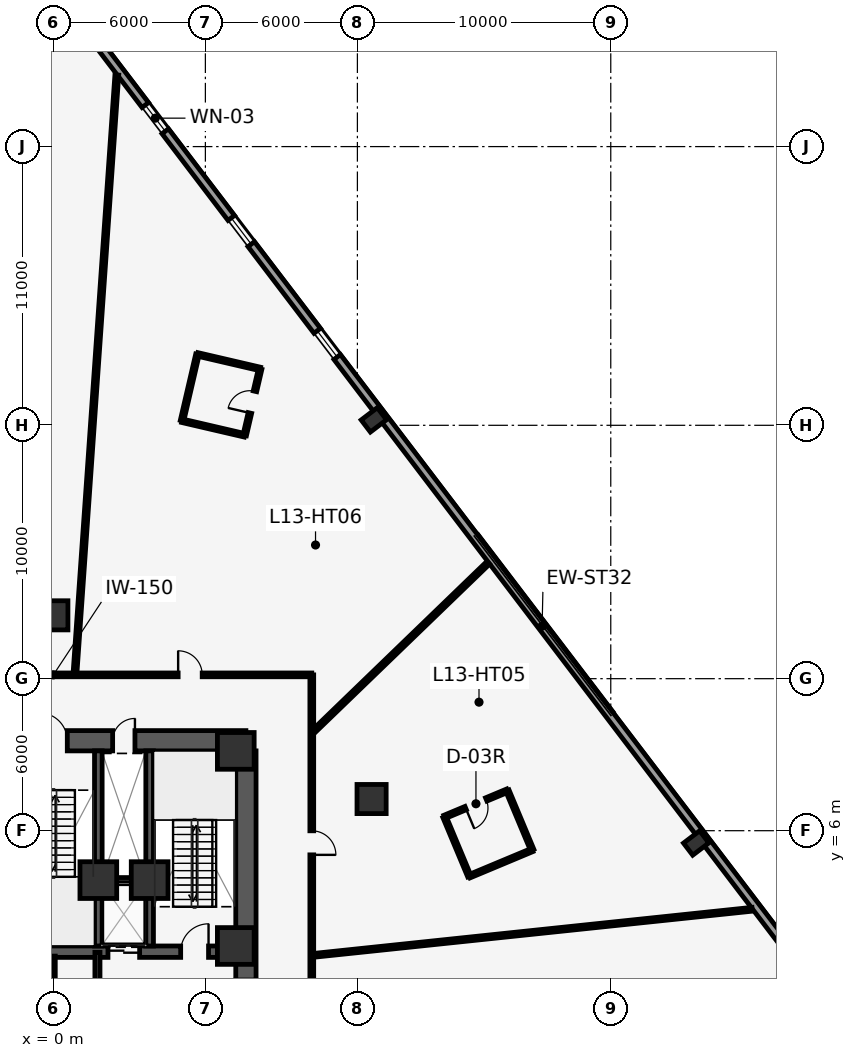
"""IFC4 building model, lengths in metres.
Left out: names, types, materials, properties, quantities, classifications, styles, units other than length and angle.
Written with IfcOpenShell. Run it as: python <this file> out.ifc"""

import sys

from ifc_helpers import new_model, si_unit, direction, frame, frame_2d, origin, origin_2d, place, context, subcontext, project, spatial, rectangle, hollow_rectangle, extrude, element, fill, save


model = new_model("IFC4")
c1 = context("Model", 3, precision=1e-05, world=origin(), true_north=direction((0.0, 1.0)))
c2 = subcontext(c1, "Body", "Model", "MODEL_VIEW")
j1 = project(units=[si_unit("LENGTHUNIT", "METRE"), si_unit("PLANEANGLEUNIT", "RADIAN")], contexts=[c1])
p1 = place(None, origin())
s1 = spatial("IfcSite", under=j1, at=p1, CompositionType="ELEMENT")
p2 = place(p1, origin())
s2 = spatial("IfcBuilding", under=s1, at=p2, CompositionType="ELEMENT")
p3 = place(p2, frame((0.0, 0.0, 62.4)))
s3 = spatial("IfcBuildingStorey", under=s2, at=p3, CompositionType="ELEMENT", Elevation=62.4)
p4 = place(p3, frame((-7.6, 9.55, 0.0), z_axis=(0.0, 0.0, 1.0), x_axis=(1.0, 0.0, 0.0)))
e1 = element("IfcWall", 1, at=p4, inside=s3, PredefinedType="SHEAR", context=c2, shape_type="SweptSolid", body=[
    extrude(rectangle(XDim=15.2, YDim=0.8, at=frame_2d((7.6, 0.0))), origin(), (0.0, 0.0, 1.0), 4.35),
])
p5 = place(p4, frame((7.05, 0.0, 0.0)))
e2 = element("IfcOpeningElement", 2, at=p5, cuts=e1, PredefinedType="OPENING", context=c2, shape_type="SweptSolid", body=[
    extrude(rectangle(XDim=1.1, YDim=2.15, at=frame_2d((0.55, 1.075))), frame((0.0, 0.41, 0.0), z_axis=(0.0, -1.0, 0.0), x_axis=(1.0, 0.0, 0.0)), (0.0, 0.0, 1.0), 0.82),
])
p6 = place(p4, frame((4.38, 0.0, 0.0)))
e3 = element("IfcOpeningElement", 3, at=p6, cuts=e1, PredefinedType="OPENING", context=c2, shape_type="SweptSolid", body=[
    extrude(rectangle(XDim=0.88, YDim=2.15, at=frame_2d((0.44, 1.075))), frame((0.0, 0.41, 0.0), z_axis=(0.0, -1.0, 0.0), x_axis=(1.0, 0.0, 0.0)), (0.0, 0.0, 1.0), 0.82),
])
p7 = place(p4, frame((9.94, 0.0, 0.0)))
e4 = element("IfcOpeningElement", 4, at=p7, cuts=e1, PredefinedType="OPENING", context=c2, shape_type="SweptSolid", body=[
    extrude(rectangle(XDim=0.88, YDim=2.15, at=frame_2d((0.44, 1.075))), frame((0.0, 0.41, 0.0), z_axis=(0.0, -1.0, 0.0), x_axis=(1.0, 0.0, 0.0)), (0.0, 0.0, 1.0), 0.82),
])
p8 = place(p3, frame((-7.2, 1.225, 0.0), z_axis=(0.0, 0.0, 1.0), x_axis=(1.0, 0.0, 0.0)))
e5 = element("IfcWall", 5, at=p8, inside=s3, PredefinedType="SHEAR", context=c2, shape_type="SweptSolid", body=[
    extrude(rectangle(XDim=14.4, YDim=0.45, at=frame_2d((7.2, 0.0))), origin(), (0.0, 0.0, 1.0), 4.35),
])
p9 = place(p8, frame((3.795, 0.0, 0.0)))
e6 = element("IfcOpeningElement", 6, at=p9, cuts=e5, PredefinedType="OPENING", context=c2, shape_type="SweptSolid", body=[
    extrude(rectangle(XDim=1.25, YDim=2.25, at=frame_2d((0.625, 1.125))), frame((0.0, 0.235, 0.0), z_axis=(0.0, -1.0, 0.0), x_axis=(1.0, 0.0, 0.0)), (0.0, 0.0, 1.0), 0.47),
])
p10 = place(p8, frame((9.355, 0.0, 0.0)))
e7 = element("IfcOpeningElement", 7, at=p10, cuts=e5, PredefinedType="OPENING", context=c2, shape_type="SweptSolid", body=[
    extrude(rectangle(XDim=1.25, YDim=2.25, at=frame_2d((0.625, 1.125))), frame((0.0, 0.235, 0.0), z_axis=(0.0, -1.0, 0.0), x_axis=(1.0, 0.0, 0.0)), (0.0, 0.0, 1.0), 0.47),
])
p11 = place(p8, frame((1.075, 0.0, 0.0)))
e8 = element("IfcOpeningElement", 8, at=p11, cuts=e5, PredefinedType="OPENING", context=c2, shape_type="SweptSolid", body=[
    extrude(rectangle(XDim=1.1, YDim=2.15, at=frame_2d((0.55, 1.075))), frame((0.0, 0.235, 0.0), z_axis=(0.0, -1.0, 0.0), x_axis=(1.0, 0.0, 0.0)), (0.0, 0.0, 1.0), 0.47),
])
p12 = place(p8, frame((12.225, 0.0, 0.0)))
e9 = element("IfcOpeningElement", 9, at=p12, cuts=e5, PredefinedType="OPENING", context=c2, shape_type="SweptSolid", body=[
    extrude(rectangle(XDim=1.1, YDim=2.15, at=frame_2d((0.55, 1.075))), frame((0.0, 0.235, 0.0), z_axis=(0.0, -1.0, 0.0), x_axis=(1.0, 0.0, 0.0)), (0.0, 0.0, 1.0), 0.47),
])
for number, where, z_axis, x_axis in (
    (10, (1.775, 1.45, 0.0), (0.0, 0.0, 1.0), (0.0, 1.0, 0.0)),
    (11, (3.8, 1.45, 0.0), (0.0, 0.0, 1.0), (0.0, 1.0, 0.0)),
):
    element("IfcWall", number, at=place(p3, frame(where, z_axis=z_axis, x_axis=x_axis)), inside=s3, PredefinedType="SHEAR", context=c2, shape_type="SweptSolid", body=[
        extrude(rectangle(XDim=7.7, YDim=0.3, at=frame_2d((3.85, 0.0))), origin(), (0.0, 0.0, 1.0), 4.35),
    ])
p13 = place(p3, frame((7.6, 0.1, 0.0), z_axis=(0.0, 0.0, 1.0), x_axis=(0.0, 1.0, 0.0)))
e12 = element("IfcWall", 12, at=p13, inside=s3, PredefinedType="SHEAR", context=c2, shape_type="SweptSolid", body=[
    extrude(rectangle(XDim=9.05, YDim=0.8, at=frame_2d((4.525, 0.0))), origin(), (0.0, 0.0, 1.0), 4.35),
])
for number, where, z_axis, x_axis in (
    (13, (7.2, 1.45, 0.0), (0.0, 0.0, 1.0), (1.0, 0.0, 0.0)),
    (14, (7.2, 9.15, 0.0), (0.0, 0.0, 1.0), (1.0, 0.0, 0.0)),
    (15, (3.8, 4.05, 0.0), (0.0, 0.0, 1.0), (1.0, 0.0, 0.0)),
    (16, (1.775, 4.05, 0.0), (0.0, 0.0, 1.0), (1.0, 0.0, 0.0)),
):
    element("IfcColumn", number, at=place(p3, frame(where, z_axis=z_axis, x_axis=x_axis)), inside=s3, PredefinedType="COLUMN", context=c2, shape_type="SweptSolid", body=[
        extrude(rectangle(XDim=1.45, YDim=1.45, at=origin_2d()), origin(), (0.0, 0.0, 1.0), 4.6),
    ])
for number, where, z_axis, x_axis in (
    (17, (12.56, 7.25, 0.0), (0.0, 0.0, 1.0), (1.0, 0.0, 0.0)),
    (18, (0.0, 14.5, 0.0), (0.0, 0.0, 1.0), (1.0, 0.0, 0.0)),
):
    element("IfcColumn", number, at=place(p3, frame(where, z_axis=z_axis, x_axis=x_axis)), inside=s3, PredefinedType="COLUMN", context=c2, shape_type="SweptSolid", body=[
        extrude(rectangle(XDim=1.15, YDim=1.15, at=origin_2d()), origin(), (0.0, 0.0, 1.0), 4.6),
    ])
for number, where, z_axis, x_axis in (
    (19, (25.371, 5.514, 0.0), (0.0, 0.0, 1.0), (-0.606, 0.795, 0.0)),
    (20, (12.649, 22.215, 0.0), (0.0, 0.0, 1.0), (-0.606, 0.795, 0.0)),
):
    element("IfcColumn", number, at=place(p3, frame(where, z_axis=z_axis, x_axis=x_axis)), inside=s3, PredefinedType="COLUMN", context=c2, shape_type="SweptSolid", body=[
        extrude(hollow_rectangle(XDim=0.6, YDim=0.8, WallThickness=0.05, at=origin_2d()), origin(), (0.0, 0.0, 1.0), 4.6),
    ])
p14 = place(p3, frame((-0.115, 39.555, 0.0), z_axis=(0.0, 0.0, 1.0), x_axis=(0.605877389385, -0.795558036243, 0.0)))
e21 = element("IfcWall", 21, at=p14, inside=s3, PredefinedType="STANDARD", context=c2, shape_type="SweptSolid", body=[
    extrude(rectangle(XDim=64.058, YDim=0.32, at=frame_2d((32.029, 0.0))), origin(), (0.0, 0.0, 1.0), 4.35),
])
p15 = place(p14, frame((6.179, 0.0, 0.85)))
e22 = element("IfcOpeningElement", 22, at=p15, cuts=e21, PredefinedType="OPENING", context=c2, shape_type="SweptSolid", body=[
    extrude(rectangle(XDim=1.3, YDim=2.1, at=frame_2d((0.65, 1.05))), frame((0.0, 0.17, 0.0), z_axis=(0.0, -1.0, 0.0), x_axis=(1.0, 0.0, 0.0)), (0.0, 0.0, 1.0), 0.34),
])
p16 = place(p14, frame((11.779, 0.0, 0.85)))
e23 = element("IfcOpeningElement", 23, at=p16, cuts=e21, PredefinedType="OPENING", context=c2, shape_type="SweptSolid", body=[
    extrude(rectangle(XDim=1.3, YDim=2.1, at=frame_2d((0.65, 1.05))), frame((0.0, 0.17, 0.0), z_axis=(0.0, -1.0, 0.0), x_axis=(1.0, 0.0, 0.0)), (0.0, 0.0, 1.0), 0.34),
])
p17 = place(p14, frame((17.379, 0.0, 0.85)))
e24 = element("IfcOpeningElement", 24, at=p17, cuts=e21, PredefinedType="OPENING", context=c2, shape_type="SweptSolid", body=[
    extrude(rectangle(XDim=1.3, YDim=2.1, at=frame_2d((0.65, 1.05))), frame((0.0, 0.17, 0.0), z_axis=(0.0, -1.0, 0.0), x_axis=(1.0, 0.0, 0.0)), (0.0, 0.0, 1.0), 0.34),
])
p18 = place(p14, frame((50.979, 0.0, 0.85)))
e25 = element("IfcOpeningElement", 25, at=p18, cuts=e21, PredefinedType="OPENING", context=c2, shape_type="SweptSolid", body=[
    extrude(rectangle(XDim=1.3, YDim=2.1, at=frame_2d((0.65, 1.05))), frame((0.0, 0.17, 0.0), z_axis=(0.0, -1.0, 0.0), x_axis=(1.0, 0.0, 0.0)), (0.0, 0.0, 1.0), 0.34),
])
p19 = place(p14, frame((56.579, 0.0, 0.85)))
e26 = element("IfcOpeningElement", 26, at=p19, cuts=e21, PredefinedType="OPENING", context=c2, shape_type="SweptSolid", body=[
    extrude(rectangle(XDim=1.3, YDim=2.1, at=frame_2d((0.65, 1.05))), frame((0.0, 0.17, 0.0), z_axis=(0.0, -1.0, 0.0), x_axis=(1.0, 0.0, 0.0)), (0.0, 0.0, 1.0), 0.34),
])
p20 = place(p3, frame((1.92, 4.05, 0.0), z_axis=(0.0, 0.0, 1.0), x_axis=(1.0, 0.0, 0.0)))
e27 = element("IfcWall", 27, at=p20, inside=s3, PredefinedType="PARTITIONING", context=c2, shape_type="SweptSolid", body=[
    extrude(rectangle(XDim=1.73, YDim=0.2, at=frame_2d((0.865, 0.0))), origin(), (0.0, 0.0, 1.0), 4.35),
])
p21 = place(p3, frame((1.74, -1.78, 0.0), z_axis=(0.0, 0.0, 1.0), x_axis=(0.0, 1.0, 0.0)))
e28 = element("IfcWall", 28, at=p21, inside=s3, PredefinedType="PARTITIONING", context=c2, shape_type="SweptSolid", body=[
    extrude(rectangle(XDim=2.98, YDim=0.2, at=frame_2d((1.49, 0.0))), origin(), (0.0, 0.0, 1.0), 4.35),
])
p22 = place(p21, frame((0.89, 0.0, 0.0)))
e29 = element("IfcOpeningElement", 29, at=p22, cuts=e28, PredefinedType="OPENING", context=c2, shape_type="SweptSolid", body=[
    extrude(rectangle(XDim=0.88, YDim=2.15, at=frame_2d((0.44, 1.075))), frame((0.0, 0.11, 0.0), z_axis=(0.0, -1.0, 0.0), x_axis=(1.0, 0.0, 0.0)), (0.0, 0.0, 1.0), 0.22),
])
p23 = place(p3, frame((0.0, -1.78, 0.0), z_axis=(0.0, 0.0, 1.0), x_axis=(0.0, 1.0, 0.0)))
e30 = element("IfcWall", 30, at=p23, inside=s3, PredefinedType="PARTITIONING", context=c2, shape_type="SweptSolid", body=[
    extrude(rectangle(XDim=2.83, YDim=0.15, at=frame_2d((1.415, 0.0))), origin(), (0.0, 0.0, 1.0), 4.35),
])
p24 = place(p3, frame((-10.2, 12.15, 0.0), z_axis=(0.0, 0.0, 1.0), x_axis=(1.0, 0.0, 0.0)))
e31 = element("IfcWall", 31, at=p24, inside=s3, PredefinedType="PARTITIONING", context=c2, shape_type="SweptSolid", body=[
    extrude(rectangle(XDim=20.4, YDim=0.15, at=frame_2d((10.2, 0.0))), origin(), (0.0, 0.0, 1.0), 4.35),
])
p25 = place(p24, frame((15.125, 0.0, 0.0)))
e32 = element("IfcOpeningElement", 32, at=p25, cuts=e31, PredefinedType="OPENING", context=c2, shape_type="SweptSolid", body=[
    extrude(rectangle(XDim=0.95, YDim=2.15, at=frame_2d((0.475, 1.075))), frame((0.0, 0.085, 0.0), z_axis=(0.0, -1.0, 0.0), x_axis=(1.0, 0.0, 0.0)), (0.0, 0.0, 1.0), 0.17),
])
p26 = place(p24, frame((6.62, 0.0, 0.0)))
e33 = element("IfcOpeningElement", 33, at=p26, cuts=e31, PredefinedType="OPENING", context=c2, shape_type="SweptSolid", body=[
    extrude(rectangle(XDim=0.95, YDim=2.15, at=frame_2d((0.475, 1.075))), frame((0.0, 0.085, 0.0), z_axis=(0.0, -1.0, 0.0), x_axis=(1.0, 0.0, 0.0)), (0.0, 0.0, 1.0), 0.17),
])
p27 = place(p3, frame((10.2, 12.15, 0.0), z_axis=(0.0, 0.0, 1.0), x_axis=(0.0, -1.0, 0.0)))
e34 = element("IfcWall", 34, at=p27, inside=s3, PredefinedType="PARTITIONING", context=c2, shape_type="SweptSolid", body=[
    extrude(rectangle(XDim=24.0, YDim=0.15, at=frame_2d((12.0, 0.0))), origin(), (0.0, 0.0, 1.0), 4.35),
])
p28 = place(p27, frame((14.875, 0.0, 0.0)))
e35 = element("IfcOpeningElement", 35, at=p28, cuts=e34, PredefinedType="OPENING", context=c2, shape_type="SweptSolid", body=[
    extrude(rectangle(XDim=0.95, YDim=2.15, at=frame_2d((0.475, 1.075))), frame((0.0, 0.085, 0.0), z_axis=(0.0, -1.0, 0.0), x_axis=(1.0, 0.0, 0.0)), (0.0, 0.0, 1.0), 0.17),
])
p29 = place(p27, frame((6.154, 0.0, 0.0)))
e36 = element("IfcOpeningElement", 36, at=p29, cuts=e34, PredefinedType="OPENING", context=c2, shape_type="SweptSolid", body=[
    extrude(rectangle(XDim=0.95, YDim=2.15, at=frame_2d((0.475, 1.075))), frame((0.0, 0.085, 0.0), z_axis=(0.0, -1.0, 0.0), x_axis=(1.0, 0.0, 0.0)), (0.0, 0.0, 1.0), 0.17),
])
p30 = place(p3, frame((10.305, 1.083, 0.0), z_axis=(0.0, 0.0, 1.0), x_axis=(0.994521458831, 0.104532616559, 0.0)))
e37 = element("IfcWall", 37, at=p30, inside=s3, PredefinedType="PARTITIONING", context=c2, shape_type="SweptSolid", body=[
    extrude(rectangle(XDim=17.372, YDim=0.15, at=frame_2d((8.686, 0.0))), origin(), (0.0, 0.0, 1.0), 4.35),
])
p31 = place(p3, frame((10.305, 9.951, 0.0), z_axis=(0.0, 0.0, 1.0), x_axis=(0.719350731968, 0.694647050247, 0.0)))
e38 = element("IfcWall", 38, at=p31, inside=s3, PredefinedType="PARTITIONING", context=c2, shape_type="SweptSolid", body=[
    extrude(rectangle(XDim=9.537, YDim=0.15, at=frame_2d((4.769, 0.0))), origin(), (0.0, 0.0, 1.0), 4.35),
])
p32 = place(p3, frame((0.857, 12.255, 0.0), z_axis=(0.0, 0.0, 1.0), x_axis=(0.069754890423, 0.997564160975, 0.0)))
e39 = element("IfcWall", 39, at=p32, inside=s3, PredefinedType="PARTITIONING", context=c2, shape_type="SweptSolid", body=[
    extrude(rectangle(XDim=23.628, YDim=0.15, at=frame_2d((11.814, 0.0))), origin(), (0.0, 0.0, 1.0), 4.35),
])
p33 = place(p3, frame((16.419, 4.201, 0.0), z_axis=(0.0, 0.0, 1.0), x_axis=(0.922509383508, 0.385974658934, 0.0)))
e40 = element("IfcWall", 40, at=p33, inside=s3, PredefinedType="PARTITIONING", context=c2, shape_type="SweptSolid", body=[
    extrude(rectangle(XDim=2.69, YDim=0.14, at=frame_2d((1.345, 0.0))), origin(), (0.0, 0.0, 1.0), 4.35),
])
p34 = place(p3, frame((18.9, 5.239, 0.0), z_axis=(0.0, 0.0, 1.0), x_axis=(-0.385945960426, 0.922521390338, 0.0)))
e41 = element("IfcWall", 41, at=p34, inside=s3, PredefinedType="PARTITIONING", context=c2, shape_type="SweptSolid", body=[
    extrude(rectangle(XDim=2.54, YDim=0.14, at=frame_2d((1.27, 0.0))), origin(), (0.0, 0.0, 1.0), 4.35),
])
p35 = place(p3, frame((17.92, 7.582, 0.0), z_axis=(0.0, 0.0, 1.0), x_axis=(-0.92257400344, -0.385820175959, 0.0)))
e42 = element("IfcWall", 42, at=p35, inside=s3, PredefinedType="PARTITIONING", context=c2, shape_type="SweptSolid", body=[
    extrude(rectangle(XDim=2.69, YDim=0.14, at=frame_2d((1.345, 0.0))), origin(), (0.0, 0.0, 1.0), 4.35),
])
p36 = place(p35, frame((0.905, 0.0, 0.0)))
e43 = element("IfcOpeningElement", 43, at=p36, cuts=e42, PredefinedType="OPENING", context=c2, shape_type="SweptSolid", body=[
    extrude(rectangle(XDim=0.88, YDim=2.1, at=frame_2d((0.44, 1.05))), frame((0.0, 0.08, 0.0), z_axis=(0.0, -1.0, 0.0), x_axis=(1.0, 0.0, 0.0)), (0.0, 0.0, 1.0), 0.16),
])
p37 = place(p3, frame((15.438, 6.544, 0.0), z_axis=(0.0, 0.0, 1.0), x_axis=(0.385877521433, -0.922550019486, 0.0)))
e44 = element("IfcWall", 44, at=p37, inside=s3, PredefinedType="PARTITIONING", context=c2, shape_type="SweptSolid", body=[
    extrude(rectangle(XDim=2.54, YDim=0.14, at=frame_2d((1.27, 0.0))), origin(), (0.0, 0.0, 1.0), 4.35),
])
p38 = place(p3, frame((7.552, 21.604, 0.0), z_axis=(0.0, 0.0, 1.0), x_axis=(0.226615610421, 0.973984273545, 0.0)))
e45 = element("IfcWall", 45, at=p38, inside=s3, PredefinedType="PARTITIONING", context=c2, shape_type="SweptSolid", body=[
    extrude(rectangle(XDim=2.69, YDim=0.14, at=frame_2d((1.345, 0.0))), origin(), (0.0, 0.0, 1.0), 4.35),
])
p39 = place(p38, frame((0.905, 0.0, 0.0)))
e46 = element("IfcOpeningElement", 46, at=p39, cuts=e45, PredefinedType="OPENING", context=c2, shape_type="SweptSolid", body=[
    extrude(rectangle(XDim=0.88, YDim=2.1, at=frame_2d((0.44, 1.05))), frame((0.0, 0.08, 0.0), z_axis=(0.0, -1.0, 0.0), x_axis=(1.0, 0.0, 0.0)), (0.0, 0.0, 1.0), 0.16),
])
p40 = place(p3, frame((8.162, 24.224, 0.0), z_axis=(0.0, 0.0, 1.0), x_axis=(-0.973976454563, 0.226649213447, 0.0)))
e47 = element("IfcWall", 47, at=p40, inside=s3, PredefinedType="PARTITIONING", context=c2, shape_type="SweptSolid", body=[
    extrude(rectangle(XDim=2.54, YDim=0.14, at=frame_2d((1.27, 0.0))), origin(), (0.0, 0.0, 1.0), 4.35),
])
p41 = place(p3, frame((5.688, 24.8, 0.0), z_axis=(0.0, 0.0, 1.0), x_axis=(-0.226615610421, -0.973984273545, 0.0)))
e48 = element("IfcWall", 48, at=p41, inside=s3, PredefinedType="PARTITIONING", context=c2, shape_type="SweptSolid", body=[
    extrude(rectangle(XDim=2.69, YDim=0.14, at=frame_2d((1.345, 0.0))), origin(), (0.0, 0.0, 1.0), 4.35),
])
p42 = place(p3, frame((5.078, 22.18, 0.0), z_axis=(0.0, 0.0, 1.0), x_axis=(0.973976454563, -0.226649213447, 0.0)))
e49 = element("IfcWall", 49, at=p42, inside=s3, PredefinedType="PARTITIONING", context=c2, shape_type="SweptSolid", body=[
    extrude(rectangle(XDim=2.54, YDim=0.14, at=frame_2d((1.27, 0.0))), origin(), (0.0, 0.0, 1.0), 4.35),
])
p43 = place(p15, origin())
e50 = element("IfcWindow", 50, at=p43, inside=s3, PartitioningType="SINGLE_PANEL", PredefinedType="WINDOW", context=c2, shape_type="SweptSolid", body=[
    extrude(rectangle(XDim=1.3, YDim=2.1, at=frame_2d((0.65, 1.05))), frame((0.0, 0.03, 0.0), z_axis=(0.0, -1.0, 0.0), x_axis=(1.0, 0.0, 0.0)), (0.0, 0.0, 1.0), 0.06),
])
fill(e22, e50)
p44 = place(p16, origin())
e51 = element("IfcWindow", 51, at=p44, inside=s3, PartitioningType="SINGLE_PANEL", PredefinedType="WINDOW", context=c2, shape_type="SweptSolid", body=[
    extrude(rectangle(XDim=1.3, YDim=2.1, at=frame_2d((0.65, 1.05))), frame((0.0, 0.03, 0.0), z_axis=(0.0, -1.0, 0.0), x_axis=(1.0, 0.0, 0.0)), (0.0, 0.0, 1.0), 0.06),
])
fill(e23, e51)
p45 = place(p17, origin())
e52 = element("IfcWindow", 52, at=p45, inside=s3, PartitioningType="SINGLE_PANEL", PredefinedType="WINDOW", context=c2, shape_type="SweptSolid", body=[
    extrude(rectangle(XDim=1.3, YDim=2.1, at=frame_2d((0.65, 1.05))), frame((0.0, 0.03, 0.0), z_axis=(0.0, -1.0, 0.0), x_axis=(1.0, 0.0, 0.0)), (0.0, 0.0, 1.0), 0.06),
])
fill(e24, e52)
p46 = place(p10, origin())
e53 = element("IfcDoor", 53, at=p46, inside=s3, OperationType="DOUBLE_DOOR_SLIDING", PredefinedType="DOOR", context=c2, shape_type="SweptSolid", body=[
    extrude(rectangle(XDim=1.25, YDim=2.25, at=frame_2d((0.625, 1.125))), frame((0.0, 0.025, 0.0), z_axis=(0.0, -1.0, 0.0), x_axis=(1.0, 0.0, 0.0)), (0.0, 0.0, 1.0), 0.05),
])
fill(e7, e53)
p47 = place(p12, origin())
e54 = element("IfcDoor", 54, at=p47, inside=s3, OperationType="SINGLE_SWING_RIGHT", PredefinedType="DOOR", context=c2, shape_type="SweptSolid", body=[
    extrude(rectangle(XDim=1.1, YDim=2.15, at=frame_2d((0.55, 1.075))), frame((0.0, 0.025, 0.0), z_axis=(0.0, -1.0, 0.0), x_axis=(1.0, 0.0, 0.0)), (0.0, 0.0, 1.0), 0.05),
])
fill(e9, e54)
p48 = place(p5, origin())
e55 = element("IfcDoor", 55, at=p48, inside=s3, OperationType="SINGLE_SWING_LEFT", PredefinedType="DOOR", context=c2, shape_type="SweptSolid", body=[
    extrude(rectangle(XDim=1.1, YDim=2.15, at=frame_2d((0.55, 1.075))), frame((0.0, 0.025, 0.0), z_axis=(0.0, -1.0, 0.0), x_axis=(1.0, 0.0, 0.0)), (0.0, 0.0, 1.0), 0.05),
])
fill(e2, e55)
p49 = place(p7, origin())
e56 = element("IfcDoor", 56, at=p49, inside=s3, OperationType="SINGLE_SWING_RIGHT", PredefinedType="DOOR", context=c2, shape_type="SweptSolid", body=[
    extrude(rectangle(XDim=0.88, YDim=2.15, at=frame_2d((0.44, 1.075))), frame((0.0, 0.025, 0.0), z_axis=(0.0, -1.0, 0.0), x_axis=(1.0, 0.0, 0.0)), (0.0, 0.0, 1.0), 0.05),
])
fill(e4, e56)
p50 = place(p36, origin())
e57 = element("IfcDoor", 57, at=p50, inside=s3, OperationType="SINGLE_SWING_RIGHT", PredefinedType="DOOR", context=c2, shape_type="SweptSolid", body=[
    extrude(rectangle(XDim=0.88, YDim=2.1, at=frame_2d((0.44, 1.05))), frame((0.0, 0.025, 0.0), z_axis=(0.0, -1.0, 0.0), x_axis=(1.0, 0.0, 0.0)), (0.0, 0.0, 1.0), 0.05),
])
fill(e43, e57)
p51 = place(p39, origin())
e58 = element("IfcDoor", 58, at=p51, inside=s3, OperationType="SINGLE_SWING_LEFT", PredefinedType="DOOR", context=c2, shape_type="SweptSolid", body=[
    extrude(rectangle(XDim=0.88, YDim=2.1, at=frame_2d((0.44, 1.05))), frame((0.0, 0.025, 0.0), z_axis=(0.0, -1.0, 0.0), x_axis=(1.0, 0.0, 0.0)), (0.0, 0.0, 1.0), 0.05),
])
fill(e46, e58)
p52 = place(p29, origin())
e59 = element("IfcDoor", 59, at=p52, inside=s3, OperationType="SINGLE_SWING_RIGHT", PredefinedType="DOOR", context=c2, shape_type="SweptSolid", body=[
    extrude(rectangle(XDim=0.95, YDim=2.15, at=frame_2d((0.475, 1.075))), frame((0.0, 0.025, 0.0), z_axis=(0.0, -1.0, 0.0), x_axis=(1.0, 0.0, 0.0)), (0.0, 0.0, 1.0), 0.05),
])
fill(e36, e59)
p53 = place(p25, origin())
e60 = element("IfcDoor", 60, at=p53, inside=s3, OperationType="SINGLE_SWING_LEFT", PredefinedType="DOOR", context=c2, shape_type="SweptSolid", body=[
    extrude(rectangle(XDim=0.95, YDim=2.15, at=frame_2d((0.475, 1.075))), frame((0.0, 0.025, 0.0), z_axis=(0.0, -1.0, 0.0), x_axis=(1.0, 0.0, 0.0)), (0.0, 0.0, 1.0), 0.05),
])
fill(e32, e60)
save(model, sys.argv[1])
